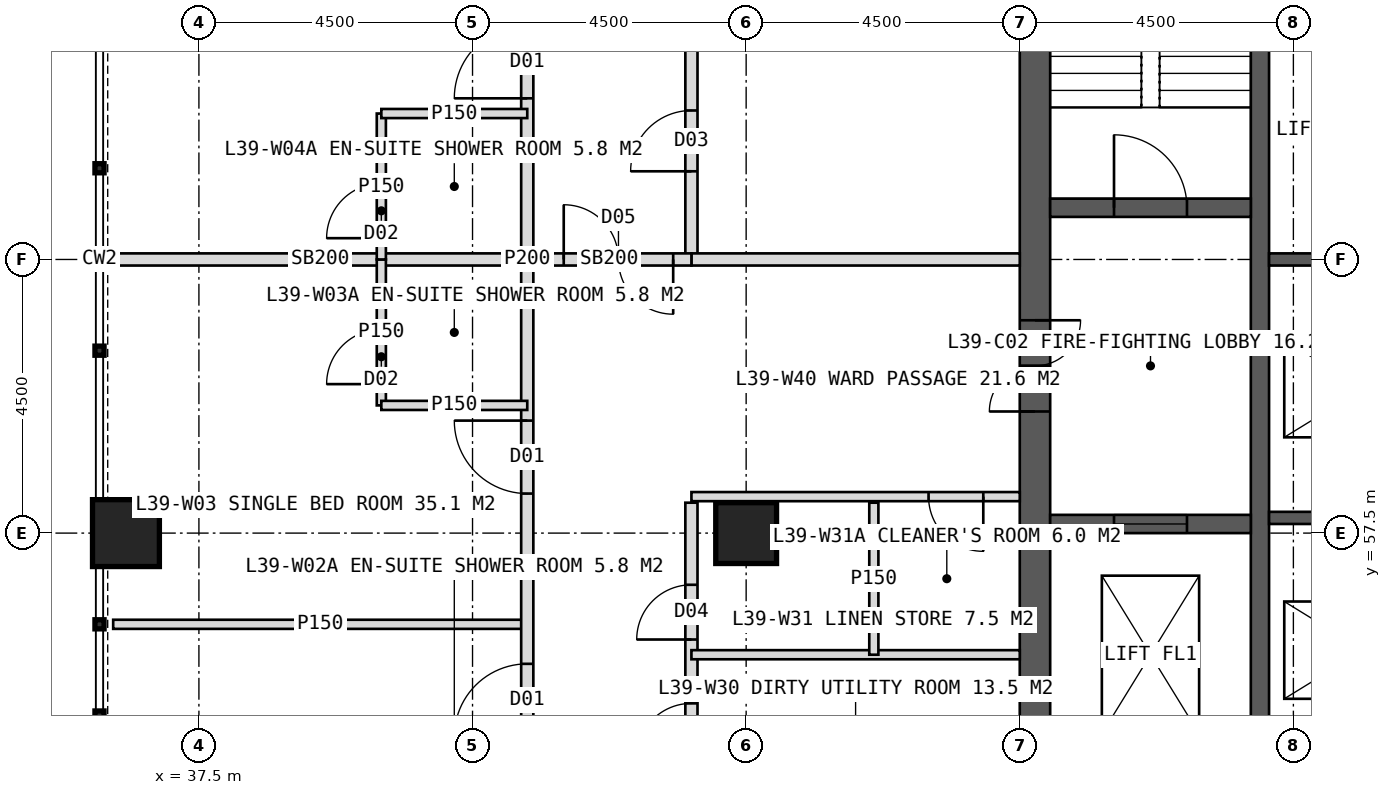
"""IFC4 building model, lengths in metres.
Left out: names, types, materials, properties, quantities, classifications, styles, units other than length and angle.
Written with IfcOpenShell. Run it as: python <this file> out.ifc"""

import sys

from ifc_helpers import new_model, si_unit, direction, frame, frame_2d, origin, origin_2d, place, context, subcontext, project, spatial, rectangle, hollow_rectangle, extrude, element, fill, save


model = new_model("IFC4")
c1 = context("Model", 3, precision=1e-05, world=origin(), true_north=direction((0.0, 1.0)))
c2 = subcontext(c1, "Body", "Model", "MODEL_VIEW")
j1 = project(units=[si_unit("LENGTHUNIT", "METRE"), si_unit("PLANEANGLEUNIT", "RADIAN")], contexts=[c1])
p1 = place(None, origin())
s1 = spatial("IfcSite", under=j1, at=p1, CompositionType="ELEMENT")
p2 = place(p1, origin())
s2 = spatial("IfcBuilding", under=s1, at=p2, CompositionType="ELEMENT")
p3 = place(p2, frame((0.0, 0.0, 164.0)))
s3 = spatial("IfcBuildingStorey", under=s2, at=p3, CompositionType="ELEMENT", Elevation=164.0)
p4 = place(p3, frame((51.25, 53.5, 0.0), z_axis=(0.0, 0.0, 1.0), x_axis=(0.0, 1.0, 0.0)))
e1 = element("IfcWall", 1, at=p4, inside=s3, PredefinedType="SHEAR", context=c2, shape_type="SweptSolid", body=[
    extrude(rectangle(XDim=17.0, YDim=0.5, at=frame_2d((8.5, 0.0))), origin(), (0.0, 0.0, 1.0), 4.0),
])
p5 = place(p4, frame((6.0, 0.0, 0.0)))
e2 = element("IfcOpeningElement", 2, at=p5, cuts=e1, PredefinedType="OPENING", context=c2, shape_type="SweptSolid", body=[
    extrude(rectangle(XDim=1.5, YDim=2.2, at=frame_2d((0.75, 1.1))), frame((0.0, 0.26, 0.0), z_axis=(0.0, -1.0, 0.0), x_axis=(1.0, 0.0, 0.0)), (0.0, 0.0, 1.0), 0.52),
])
p6 = place(p3, frame((54.95, 53.5, 0.0), z_axis=(0.0, 0.0, 1.0), x_axis=(0.0, 1.0, 0.0)))
e3 = element("IfcWall", 3, at=p6, inside=s3, PredefinedType="SHEAR", context=c2, shape_type="SweptSolid", body=[
    extrude(rectangle(XDim=17.0, YDim=0.3, at=frame_2d((8.5, 0.0))), origin(), (0.0, 0.0, 1.0), 4.0),
])
for number, where, z_axis, x_axis in (
    (4, (55.1, 57.75, 0.0), (0.0, 0.0, 1.0), (1.0, 0.0, 0.0)),
    (5, (55.1, 62.0, 0.0), (0.0, 0.0, 1.0), (1.0, 0.0, 0.0)),
):
    element("IfcWall", number, at=place(p3, frame(where, z_axis=z_axis, x_axis=x_axis)), inside=s3, PredefinedType="SHEAR", context=c2, shape_type="SweptSolid", body=[
        extrude(rectangle(XDim=3.05, YDim=0.2, at=frame_2d((1.525, 0.0))), origin(), (0.0, 0.0, 1.0), 4.0),
    ])
p7 = place(p3, frame((51.5, 62.85, 0.0), z_axis=(0.0, 0.0, 1.0), x_axis=(1.0, 0.0, 0.0)))
e6 = element("IfcWall", 6, at=p7, inside=s3, PredefinedType="SHEAR", context=c2, shape_type="SweptSolid", body=[
    extrude(rectangle(XDim=3.3, YDim=0.3, at=frame_2d((1.65, 0.0))), origin(), (0.0, 0.0, 1.0), 4.0),
])
p8 = place(p7, frame((1.05, 0.0, 0.0)))
e7 = element("IfcOpeningElement", 7, at=p8, cuts=e6, PredefinedType="OPENING", context=c2, shape_type="SweptSolid", body=[
    extrude(rectangle(XDim=1.2, YDim=2.1, at=frame_2d((0.6, 1.05))), frame((0.0, 0.16, 0.0), z_axis=(0.0, -1.0, 0.0), x_axis=(1.0, 0.0, 0.0)), (0.0, 0.0, 1.0), 0.32),
])
p9 = place(p3, frame((51.5, 57.65, 0.0), z_axis=(0.0, 0.0, 1.0), x_axis=(1.0, 0.0, 0.0)))
e8 = element("IfcWall", 8, at=p9, inside=s3, PredefinedType="SHEAR", context=c2, shape_type="SweptSolid", body=[
    extrude(rectangle(XDim=3.3, YDim=0.3, at=frame_2d((1.65, 0.0))), origin(), (0.0, 0.0, 1.0), 4.0),
])
p10 = place(p9, frame((1.05, 0.0, 0.0)))
e9 = element("IfcOpeningElement", 9, at=p10, cuts=e8, PredefinedType="OPENING", context=c2, shape_type="SweptSolid", body=[
    extrude(rectangle(XDim=1.2, YDim=2.2, at=frame_2d((0.6, 1.1))), frame((0.0, 0.16, 0.0), z_axis=(0.0, -1.0, 0.0), x_axis=(1.0, 0.0, 0.0)), (0.0, 0.0, 1.0), 0.32),
])
p11 = place(p3, frame((46.5, 57.5, 0.0), z_axis=(0.0, 0.0, 1.0), x_axis=(1.0, 0.0, 0.0)))
e10 = element("IfcColumn", 10, at=p11, inside=s3, PredefinedType="COLUMN", context=c2, shape_type="SweptSolid", body=[
    extrude(hollow_rectangle(XDim=1.0, YDim=1.0, WallThickness=0.1, at=origin_2d()), origin(), (0.0, 0.0, 1.0), 4.0),
])
p12 = place(p3, frame((36.3, 57.5, 0.0), z_axis=(0.0, 0.0, 1.0), x_axis=(1.0, 0.0, 0.0)))
e11 = element("IfcColumn", 11, at=p12, inside=s3, PredefinedType="COLUMN", context=c2, shape_type="SweptSolid", body=[
    extrude(hollow_rectangle(XDim=1.1, YDim=1.1, WallThickness=0.1, at=origin_2d()), origin(), (0.0, 0.0, 1.0), 4.0),
])
p13 = place(p3, frame((42.9, 56.0, 0.0), z_axis=(0.0, 0.0, 1.0), x_axis=(-1.0, 0.0, 0.0)))
e12 = element("IfcWall", 12, at=p13, inside=s3, PredefinedType="PARTITIONING", context=c2, shape_type="SweptSolid", body=[
    extrude(rectangle(XDim=6.81, YDim=0.15, at=frame_2d((3.405, 0.0))), origin(), (0.0, 0.0, 1.0), 3.75),
])
p14 = place(p3, frame((42.9, 62.0, 0.0), z_axis=(0.0, 0.0, 1.0), x_axis=(-1.0, 0.0, 0.0)))
e13 = element("IfcWall", 13, at=p14, inside=s3, PredefinedType="SOLIDWALL", context=c2, shape_type="SweptSolid", body=[
    extrude(rectangle(XDim=6.81, YDim=0.2, at=frame_2d((3.405, 0.0))), origin(), (0.0, 0.0, 1.0), 2.95),
])
p15 = place(p3, frame((42.9, 44.9, 0.0), z_axis=(0.0, 0.0, 1.0), x_axis=(0.0, 1.0, 0.0)))
e14 = element("IfcWall", 14, at=p15, inside=s3, PredefinedType="PARTITIONING", context=c2, shape_type="SweptSolid", body=[
    extrude(rectangle(XDim=34.2, YDim=0.2, at=frame_2d((17.1, 0.0))), origin(), (0.0, 0.0, 1.0), 3.75),
])
p16 = place(p15, frame((2.15, 0.0, 0.0)))
e15 = element("IfcOpeningElement", 15, at=p16, cuts=e14, PredefinedType="OPENING", context=c2, shape_type="SweptSolid", body=[
    extrude(rectangle(XDim=1.2, YDim=2.2, at=frame_2d((0.6, 1.1))), frame((0.0, 0.11, 0.0), z_axis=(0.0, -1.0, 0.0), x_axis=(1.0, 0.0, 0.0)), (0.0, 0.0, 1.0), 0.22),
])
p17 = place(p15, frame((9.25, 0.0, 0.0)))
e16 = element("IfcOpeningElement", 16, at=p17, cuts=e14, PredefinedType="OPENING", context=c2, shape_type="SweptSolid", body=[
    extrude(rectangle(XDim=1.2, YDim=2.2, at=frame_2d((0.6, 1.1))), frame((0.0, 0.11, 0.0), z_axis=(0.0, -1.0, 0.0), x_axis=(1.0, 0.0, 0.0)), (0.0, 0.0, 1.0), 0.22),
])
p18 = place(p15, frame((13.25, 0.0, 0.0)))
e17 = element("IfcOpeningElement", 17, at=p18, cuts=e14, PredefinedType="OPENING", context=c2, shape_type="SweptSolid", body=[
    extrude(rectangle(XDim=1.2, YDim=2.2, at=frame_2d((0.6, 1.1))), frame((0.0, 0.11, 0.0), z_axis=(0.0, -1.0, 0.0), x_axis=(1.0, 0.0, 0.0)), (0.0, 0.0, 1.0), 0.22),
])
p19 = place(p15, frame((19.75, 0.0, 0.0)))
e18 = element("IfcOpeningElement", 18, at=p19, cuts=e14, PredefinedType="OPENING", context=c2, shape_type="SweptSolid", body=[
    extrude(rectangle(XDim=1.2, YDim=2.2, at=frame_2d((0.6, 1.1))), frame((0.0, 0.11, 0.0), z_axis=(0.0, -1.0, 0.0), x_axis=(1.0, 0.0, 0.0)), (0.0, 0.0, 1.0), 0.22),
])
p20 = place(p15, frame((30.35, 0.0, 0.0)))
e19 = element("IfcOpeningElement", 19, at=p20, cuts=e14, PredefinedType="OPENING", context=c2, shape_type="SweptSolid", body=[
    extrude(rectangle(XDim=1.2, YDim=2.2, at=frame_2d((0.6, 1.1))), frame((0.0, 0.11, 0.0), z_axis=(0.0, -1.0, 0.0), x_axis=(1.0, 0.0, 0.0)), (0.0, 0.0, 1.0), 0.22),
])
p21 = place(p3, frame((40.5, 59.6, 0.0), z_axis=(0.0, 0.0, 1.0), x_axis=(0.0, 1.0, 0.0)))
e20 = element("IfcWall", 20, at=p21, inside=s3, PredefinedType="PARTITIONING", context=c2, shape_type="SweptSolid", body=[
    extrude(rectangle(XDim=2.4, YDim=0.15, at=frame_2d((1.2, 0.0))), origin(), (0.0, 0.0, 1.0), 3.75),
])
p22 = place(p21, frame((0.35, 0.0, 0.0)))
e21 = element("IfcOpeningElement", 21, at=p22, cuts=e20, PredefinedType="OPENING", context=c2, shape_type="SweptSolid", body=[
    extrude(rectangle(XDim=0.9, YDim=2.1, at=frame_2d((0.45, 1.05))), frame((0.0, 0.085, 0.0), z_axis=(0.0, -1.0, 0.0), x_axis=(1.0, 0.0, 0.0)), (0.0, 0.0, 1.0), 0.17),
])
p23 = place(p3, frame((42.9, 59.6, 0.0), z_axis=(0.0, 0.0, 1.0), x_axis=(-1.0, 0.0, 0.0)))
e22 = element("IfcWall", 22, at=p23, inside=s3, PredefinedType="PARTITIONING", context=c2, shape_type="SweptSolid", body=[
    extrude(rectangle(XDim=2.4, YDim=0.15, at=frame_2d((1.2, 0.0))), origin(), (0.0, 0.0, 1.0), 3.75),
])
p24 = place(p3, frame((40.5, 62.0, 0.0), z_axis=(0.0, 0.0, 1.0), x_axis=(0.0, 1.0, 0.0)))
e23 = element("IfcWall", 23, at=p24, inside=s3, PredefinedType="PARTITIONING", context=c2, shape_type="SweptSolid", body=[
    extrude(rectangle(XDim=2.4, YDim=0.15, at=frame_2d((1.2, 0.0))), origin(), (0.0, 0.0, 1.0), 3.75),
])
p25 = place(p24, frame((0.35, 0.0, 0.0)))
e24 = element("IfcOpeningElement", 24, at=p25, cuts=e23, PredefinedType="OPENING", context=c2, shape_type="SweptSolid", body=[
    extrude(rectangle(XDim=0.9, YDim=2.1, at=frame_2d((0.45, 1.05))), frame((0.0, 0.085, 0.0), z_axis=(0.0, -1.0, 0.0), x_axis=(1.0, 0.0, 0.0)), (0.0, 0.0, 1.0), 0.17),
])
p26 = place(p3, frame((42.9, 64.4, 0.0), z_axis=(0.0, 0.0, 1.0), x_axis=(-1.0, 0.0, 0.0)))
e25 = element("IfcWall", 25, at=p26, inside=s3, PredefinedType="PARTITIONING", context=c2, shape_type="SweptSolid", body=[
    extrude(rectangle(XDim=2.4, YDim=0.15, at=frame_2d((1.2, 0.0))), origin(), (0.0, 0.0, 1.0), 3.75),
])
p27 = place(p3, frame((45.6, 47.6, 0.0), z_axis=(0.0, 0.0, 1.0), x_axis=(0.0, 1.0, 0.0)))
e26 = element("IfcWall", 26, at=p27, inside=s3, PredefinedType="PARTITIONING", context=c2, shape_type="SweptSolid", body=[
    extrude(rectangle(XDim=10.4, YDim=0.2, at=frame_2d((5.2, 0.0))), origin(), (0.0, 0.0, 1.0), 3.75),
])
p28 = place(p27, frame((6.2, 0.0, 0.0)))
e27 = element("IfcOpeningElement", 27, at=p28, cuts=e26, PredefinedType="OPENING", context=c2, shape_type="SweptSolid", body=[
    extrude(rectangle(XDim=0.9, YDim=2.1, at=frame_2d((0.45, 1.05))), frame((0.0, 0.11, 0.0), z_axis=(0.0, -1.0, 0.0), x_axis=(1.0, 0.0, 0.0)), (0.0, 0.0, 1.0), 0.22),
])
p29 = place(p27, frame((8.15, 0.0, 0.0)))
e28 = element("IfcOpeningElement", 28, at=p29, cuts=e26, PredefinedType="OPENING", context=c2, shape_type="SweptSolid", body=[
    extrude(rectangle(XDim=0.9, YDim=2.1, at=frame_2d((0.45, 1.05))), frame((0.0, 0.11, 0.0), z_axis=(0.0, -1.0, 0.0), x_axis=(1.0, 0.0, 0.0)), (0.0, 0.0, 1.0), 0.22),
])
p30 = place(p3, frame((45.6, 62.0, 0.0), z_axis=(0.0, 0.0, 1.0), x_axis=(0.0, 1.0, 0.0)))
e29 = element("IfcWall", 29, at=p30, inside=s3, PredefinedType="PARTITIONING", context=c2, shape_type="SweptSolid", body=[
    extrude(rectangle(XDim=14.4, YDim=0.2, at=frame_2d((7.2, 0.0))), origin(), (0.0, 0.0, 1.0), 3.75),
])
p31 = place(p30, frame((1.45, 0.0, 0.0)))
e30 = element("IfcOpeningElement", 30, at=p31, cuts=e29, PredefinedType="OPENING", context=c2, shape_type="SweptSolid", body=[
    extrude(rectangle(XDim=1.0, YDim=2.1, at=frame_2d((0.5, 1.05))), frame((0.0, 0.11, 0.0), z_axis=(0.0, -1.0, 0.0), x_axis=(1.0, 0.0, 0.0)), (0.0, 0.0, 1.0), 0.22),
])
p32 = place(p30, frame((11.2, 0.0, 0.0)))
e31 = element("IfcOpeningElement", 31, at=p32, cuts=e29, PredefinedType="OPENING", context=c2, shape_type="SweptSolid", body=[
    extrude(rectangle(XDim=1.0, YDim=2.1, at=frame_2d((0.5, 1.05))), frame((0.0, 0.11, 0.0), z_axis=(0.0, -1.0, 0.0), x_axis=(1.0, 0.0, 0.0)), (0.0, 0.0, 1.0), 0.22),
])
p33 = place(p3, frame((51.0, 58.1, 0.0), z_axis=(0.0, 0.0, 1.0), x_axis=(-1.0, 0.0, 0.0)))
e32 = element("IfcWall", 32, at=p33, inside=s3, PredefinedType="PARTITIONING", context=c2, shape_type="SweptSolid", body=[
    extrude(rectangle(XDim=5.4, YDim=0.15, at=frame_2d((2.7, 0.0))), origin(), (0.0, 0.0, 1.0), 3.75),
])
p34 = place(p33, frame((0.6, 0.0, 0.0)))
e33 = element("IfcOpeningElement", 33, at=p34, cuts=e32, PredefinedType="OPENING", context=c2, shape_type="SweptSolid", body=[
    extrude(rectangle(XDim=0.9, YDim=2.1, at=frame_2d((0.45, 1.05))), frame((0.0, 0.085, 0.0), z_axis=(0.0, -1.0, 0.0), x_axis=(1.0, 0.0, 0.0)), (0.0, 0.0, 1.0), 0.17),
])
p35 = place(p3, frame((51.0, 62.0, 0.0), z_axis=(0.0, 0.0, 1.0), x_axis=(-1.0, 0.0, 0.0)))
e34 = element("IfcWall", 34, at=p35, inside=s3, PredefinedType="SOLIDWALL", context=c2, shape_type="SweptSolid", body=[
    extrude(rectangle(XDim=5.4, YDim=0.2, at=frame_2d((2.7, 0.0))), origin(), (0.0, 0.0, 1.0), 2.95),
])
p36 = place(p3, frame((51.0, 55.5, 0.0), z_axis=(0.0, 0.0, 1.0), x_axis=(-1.0, 0.0, 0.0)))
e35 = element("IfcWall", 35, at=p36, inside=s3, PredefinedType="PARTITIONING", context=c2, shape_type="SweptSolid", body=[
    extrude(rectangle(XDim=5.4, YDim=0.15, at=frame_2d((2.7, 0.0))), origin(), (0.0, 0.0, 1.0), 3.75),
])
p37 = place(p3, frame((48.6, 55.5, 0.0), z_axis=(0.0, 0.0, 1.0), x_axis=(0.0, 1.0, 0.0)))
e36 = element("IfcWall", 36, at=p37, inside=s3, PredefinedType="PARTITIONING", context=c2, shape_type="SweptSolid", body=[
    extrude(rectangle(XDim=2.5, YDim=0.15, at=frame_2d((1.25, 0.0))), origin(), (0.0, 0.0, 1.0), 3.75),
])
p38 = place(p3, frame((45.6, 62.0, 0.0), z_axis=(0.0, 0.0, 1.0), x_axis=(-1.0, 0.0, 0.0)))
e37 = element("IfcWall", 37, at=p38, inside=s3, PredefinedType="SOLIDWALL", context=c2, shape_type="SweptSolid", body=[
    extrude(rectangle(XDim=2.7, YDim=0.2, at=frame_2d((1.35, 0.0))), origin(), (0.0, 0.0, 1.0), 2.95),
])
p39 = place(p38, frame((0.3, 0.0, 0.0)))
e38 = element("IfcOpeningElement", 38, at=p39, cuts=e37, PredefinedType="OPENING", context=c2, shape_type="SweptSolid", body=[
    extrude(rectangle(XDim=1.8, YDim=2.2, at=frame_2d((0.9, 1.1))), frame((0.0, 0.11, 0.0), z_axis=(0.0, -1.0, 0.0), x_axis=(1.0, 0.0, 0.0)), (0.0, 0.0, 1.0), 0.22),
])
p40 = place(p17, origin())
e39 = element("IfcDoor", 39, at=p40, inside=s3, OperationType="SINGLE_SWING_LEFT", PredefinedType="DOOR", context=c2, shape_type="SweptSolid", body=[
    extrude(rectangle(XDim=1.2, YDim=2.2, at=frame_2d((0.6, 1.1))), frame((0.0, 0.025, 0.0), z_axis=(0.0, -1.0, 0.0), x_axis=(1.0, 0.0, 0.0)), (0.0, 0.0, 1.0), 0.05),
])
fill(e16, e39)
p41 = place(p18, origin())
e40 = element("IfcDoor", 40, at=p41, inside=s3, OperationType="SINGLE_SWING_RIGHT", PredefinedType="DOOR", context=c2, shape_type="SweptSolid", body=[
    extrude(rectangle(XDim=1.2, YDim=2.2, at=frame_2d((0.6, 1.1))), frame((0.0, 0.025, 0.0), z_axis=(0.0, -1.0, 0.0), x_axis=(1.0, 0.0, 0.0)), (0.0, 0.0, 1.0), 0.05),
])
fill(e17, e40)
p42 = place(p22, origin())
e41 = element("IfcDoor", 41, at=p42, inside=s3, OperationType="SINGLE_SWING_LEFT", PredefinedType="DOOR", context=c2, shape_type="SweptSolid", body=[
    extrude(rectangle(XDim=0.9, YDim=2.1, at=frame_2d((0.45, 1.05))), frame((0.0, 0.025, 0.0), z_axis=(0.0, -1.0, 0.0), x_axis=(1.0, 0.0, 0.0)), (0.0, 0.0, 1.0), 0.05),
])
fill(e21, e41)
p43 = place(p19, origin())
e42 = element("IfcDoor", 42, at=p43, inside=s3, OperationType="SINGLE_SWING_LEFT", PredefinedType="DOOR", context=c2, shape_type="SweptSolid", body=[
    extrude(rectangle(XDim=1.2, YDim=2.2, at=frame_2d((0.6, 1.1))), frame((0.0, 0.025, 0.0), z_axis=(0.0, -1.0, 0.0), x_axis=(1.0, 0.0, 0.0)), (0.0, 0.0, 1.0), 0.05),
])
fill(e18, e42)
p44 = place(p25, origin())
e43 = element("IfcDoor", 43, at=p44, inside=s3, OperationType="SINGLE_SWING_LEFT", PredefinedType="DOOR", context=c2, shape_type="SweptSolid", body=[
    extrude(rectangle(XDim=0.9, YDim=2.1, at=frame_2d((0.45, 1.05))), frame((0.0, 0.025, 0.0), z_axis=(0.0, -1.0, 0.0), x_axis=(1.0, 0.0, 0.0)), (0.0, 0.0, 1.0), 0.05),
])
fill(e24, e43)
p45 = place(p28, origin())
e44 = element("IfcDoor", 44, at=p45, inside=s3, OperationType="SINGLE_SWING_LEFT", PredefinedType="DOOR", context=c2, shape_type="SweptSolid", body=[
    extrude(rectangle(XDim=0.9, YDim=2.1, at=frame_2d((0.45, 1.05))), frame((0.0, 0.025, 0.0), z_axis=(0.0, -1.0, 0.0), x_axis=(1.0, 0.0, 0.0)), (0.0, 0.0, 1.0), 0.05),
])
fill(e27, e44)
p46 = place(p34, origin())
e45 = element("IfcDoor", 45, at=p46, inside=s3, OperationType="SINGLE_SWING_LEFT", PredefinedType="DOOR", context=c2, shape_type="SweptSolid", body=[
    extrude(rectangle(XDim=0.9, YDim=2.1, at=frame_2d((0.45, 1.05))), frame((0.0, 0.025, 0.0), z_axis=(0.0, -1.0, 0.0), x_axis=(1.0, 0.0, 0.0)), (0.0, 0.0, 1.0), 0.05),
])
fill(e33, e45)
p47 = place(p29, origin())
e46 = element("IfcDoor", 46, at=p47, inside=s3, OperationType="SINGLE_SWING_LEFT", PredefinedType="DOOR", context=c2, shape_type="SweptSolid", body=[
    extrude(rectangle(XDim=0.9, YDim=2.1, at=frame_2d((0.45, 1.05))), frame((0.0, 0.025, 0.0), z_axis=(0.0, -1.0, 0.0), x_axis=(1.0, 0.0, 0.0)), (0.0, 0.0, 1.0), 0.05),
])
fill(e28, e46)
p48 = place(p31, origin())
e47 = element("IfcDoor", 47, at=p48, inside=s3, OperationType="SINGLE_SWING_LEFT", PredefinedType="DOOR", context=c2, shape_type="SweptSolid", body=[
    extrude(rectangle(XDim=1.0, YDim=2.1, at=frame_2d((0.5, 1.05))), frame((0.0, 0.025, 0.0), z_axis=(0.0, -1.0, 0.0), x_axis=(1.0, 0.0, 0.0)), (0.0, 0.0, 1.0), 0.05),
])
fill(e30, e47)
p49 = place(p39, origin())
e48 = element("IfcDoor", 48, at=p49, inside=s3, OperationType="DOUBLE_DOOR_DOUBLE_SWING", PredefinedType="DOOR", context=c2, shape_type="SweptSolid", body=[
    extrude(rectangle(XDim=1.8, YDim=2.2, at=frame_2d((0.9, 1.1))), frame((0.0, 0.025, 0.0), z_axis=(0.0, -1.0, 0.0), x_axis=(1.0, 0.0, 0.0)), (0.0, 0.0, 1.0), 0.05),
])
fill(e38, e48)
p50 = place(p5, origin())
e49 = element("IfcDoor", 49, at=p50, inside=s3, OperationType="DOUBLE_DOOR_SINGLE_SWING", PredefinedType="DOOR", context=c2, shape_type="SweptSolid", body=[
    extrude(rectangle(XDim=1.5, YDim=2.2, at=frame_2d((0.75, 1.1))), frame((0.0, 0.025, 0.0), z_axis=(0.0, -1.0, 0.0), x_axis=(1.0, 0.0, 0.0)), (0.0, 0.0, 1.0), 0.05),
])
fill(e2, e49)
p51 = place(p8, origin())
e50 = element("IfcDoor", 50, at=p51, inside=s3, OperationType="SINGLE_SWING_LEFT", PredefinedType="DOOR", context=c2, shape_type="SweptSolid", body=[
    extrude(rectangle(XDim=1.2, YDim=2.1, at=frame_2d((0.6, 1.05))), frame((0.0, 0.025, 0.0), z_axis=(0.0, -1.0, 0.0), x_axis=(1.0, 0.0, 0.0)), (0.0, 0.0, 1.0), 0.05),
])
fill(e7, e50)
p52 = place(p10, origin())
e51 = element("IfcDoor", 51, at=p52, inside=s3, OperationType="SLIDING_TO_LEFT", PredefinedType="DOOR", context=c2, shape_type="SweptSolid", body=[
    extrude(rectangle(XDim=1.2, YDim=2.2, at=frame_2d((0.6, 1.1))), frame((0.0, 0.025, 0.0), z_axis=(0.0, -1.0, 0.0), x_axis=(1.0, 0.0, 0.0)), (0.0, 0.0, 1.0), 0.05),
])
fill(e9, e51)
save(model, sys.argv[1])
